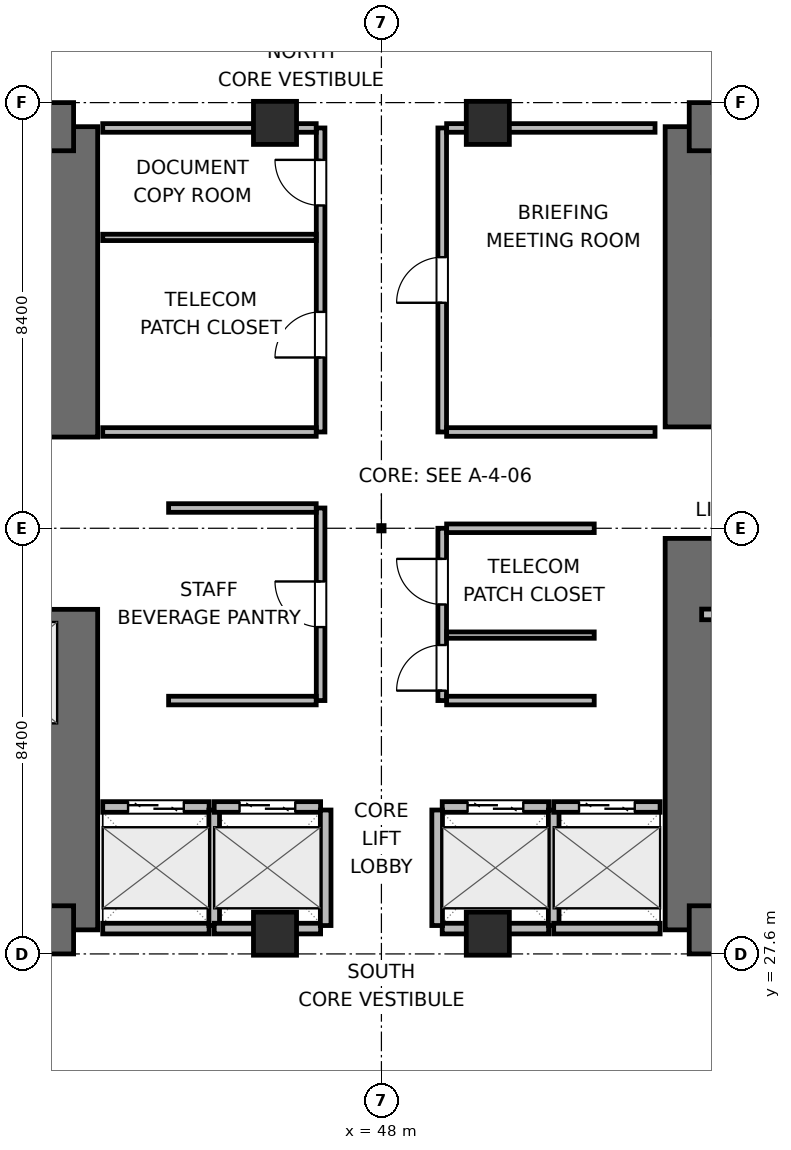
"""IFC4 building model, lengths in metres.
Left out: names, types, materials, properties, quantities, classifications, styles, units other than length and angle.
Written with IfcOpenShell. Run it as: python <this file> out.ifc"""

import sys

from ifc_helpers import new_model, si_unit, direction, frame, frame_2d, origin, origin_2d, place, context, subcontext, project, spatial, rectangle, extrude, element, fill, save


model = new_model("IFC4")
c1 = context("Model", 3, precision=1e-05, world=origin(), true_north=direction((0.0, 1.0)))
c2 = subcontext(c1, "Body", "Model", "MODEL_VIEW")
j1 = project(units=[si_unit("LENGTHUNIT", "METRE"), si_unit("PLANEANGLEUNIT", "RADIAN")], contexts=[c1])
p1 = place(None, origin())
s1 = spatial("IfcSite", under=j1, at=p1, CompositionType="ELEMENT")
p2 = place(p1, origin())
s2 = spatial("IfcBuilding", under=s1, at=p2, CompositionType="ELEMENT")
p3 = place(p2, frame((0.0, 0.0, 89.7)))
s3 = spatial("IfcBuildingStorey", under=s2, at=p3, CompositionType="ELEMENT", Elevation=89.7)
p4 = place(p3, frame((41.925, 28.075, 0.0), z_axis=(0.0, 0.0, 1.0), x_axis=(0.0, 1.0, 0.0)))
e1 = element("IfcWall", 1, at=p4, inside=s3, PredefinedType="SHEAR", context=c2, shape_type="SweptSolid", body=[
    extrude(rectangle(XDim=6.325, YDim=0.95, at=frame_2d((3.163, 0.0))), origin(), (0.0, 0.0, 1.0), 3.9),
])
p5 = place(p3, frame((41.925, 37.8, 0.0), z_axis=(0.0, 0.0, 1.0), x_axis=(0.0, 1.0, 0.0)))
e2 = element("IfcWall", 2, at=p5, inside=s3, PredefinedType="SHEAR", context=c2, shape_type="SweptSolid", body=[
    extrude(rectangle(XDim=6.125, YDim=0.95, at=frame_2d((3.062, 0.0))), origin(), (0.0, 0.0, 1.0), 3.9),
])
p6 = place(p3, frame((32.875, 28.075, 0.0), z_axis=(0.0, 0.0, 1.0), x_axis=(1.0, 0.0, 0.0)))
e3 = element("IfcWall", 3, at=p6, inside=s3, PredefinedType="SHEAR", context=c2, shape_type="SweptSolid", body=[
    extrude(rectangle(XDim=9.05, YDim=0.95, at=frame_2d((4.525, 0.0))), origin(), (0.0, 0.0, 1.0), 3.9),
])
p7 = place(p6, frame((4.975, 0.0, 0.0)))
e4 = element("IfcOpeningElement", 4, at=p7, cuts=e3, PredefinedType="OPENING", context=c2, shape_type="SweptSolid", body=[
    extrude(rectangle(XDim=1.05, YDim=2.04, at=frame_2d((0.525, 1.02))), frame((0.0, 0.485, 0.0), z_axis=(0.0, -1.0, 0.0), x_axis=(1.0, 0.0, 0.0)), (0.0, 0.0, 1.0), 0.97),
])
p8 = place(p3, frame((32.875, 43.925, 0.0), z_axis=(0.0, 0.0, 1.0), x_axis=(1.0, 0.0, 0.0)))
e5 = element("IfcWall", 5, at=p8, inside=s3, PredefinedType="SHEAR", context=c2, shape_type="SweptSolid", body=[
    extrude(rectangle(XDim=9.05, YDim=0.95, at=frame_2d((4.525, 0.0))), origin(), (0.0, 0.0, 1.0), 3.9),
])
p9 = place(p8, frame((0.975, 0.0, 0.0)))
e6 = element("IfcOpeningElement", 6, at=p9, cuts=e5, PredefinedType="OPENING", context=c2, shape_type="SweptSolid", body=[
    extrude(rectangle(XDim=0.95, YDim=2.04, at=frame_2d((0.475, 1.02))), frame((0.0, 0.485, 0.0), z_axis=(0.0, -1.0, 0.0), x_axis=(1.0, 0.0, 0.0)), (0.0, 0.0, 1.0), 0.97),
])
p10 = place(p8, frame((4.225, 0.0, 0.0)))
e7 = element("IfcOpeningElement", 7, at=p10, cuts=e5, PredefinedType="OPENING", context=c2, shape_type="SweptSolid", body=[
    extrude(rectangle(XDim=0.9, YDim=2.02, at=frame_2d((0.45, 1.01))), frame((0.0, 0.485, 0.0), z_axis=(0.0, -1.0, 0.0), x_axis=(1.0, 0.0, 0.0)), (0.0, 0.0, 1.0), 0.97),
])
p11 = place(p8, frame((7.125, 0.0, 0.0)))
e8 = element("IfcOpeningElement", 8, at=p11, cuts=e5, PredefinedType="OPENING", context=c2, shape_type="SweptSolid", body=[
    extrude(rectangle(XDim=0.9, YDim=2.02, at=frame_2d((0.45, 1.01))), frame((0.0, 0.485, 0.0), z_axis=(0.0, -1.0, 0.0), x_axis=(1.0, 0.0, 0.0)), (0.0, 0.0, 1.0), 0.97),
])
p12 = place(p3, frame((54.075, 28.075, 0.0), z_axis=(0.0, 0.0, 1.0), x_axis=(0.0, 1.0, 0.0)))
e9 = element("IfcWall", 9, at=p12, inside=s3, PredefinedType="SHEAR", context=c2, shape_type="SweptSolid", body=[
    extrude(rectangle(XDim=7.725, YDim=0.95, at=frame_2d((3.863, 0.0))), origin(), (0.0, 0.0, 1.0), 3.9),
])
p13 = place(p3, frame((54.075, 38.0, 0.0), z_axis=(0.0, 0.0, 1.0), x_axis=(0.0, 1.0, 0.0)))
e10 = element("IfcWall", 10, at=p13, inside=s3, PredefinedType="SHEAR", context=c2, shape_type="SweptSolid", body=[
    extrude(rectangle(XDim=5.925, YDim=0.95, at=frame_2d((2.962, 0.0))), origin(), (0.0, 0.0, 1.0), 3.9),
])
p14 = place(p3, frame((54.075, 28.075, 0.0), z_axis=(0.0, 0.0, 1.0), x_axis=(1.0, 0.0, 0.0)))
e11 = element("IfcWall", 11, at=p14, inside=s3, PredefinedType="SHEAR", context=c2, shape_type="SweptSolid", body=[
    extrude(rectangle(XDim=9.05, YDim=0.95, at=frame_2d((4.525, 0.0))), origin(), (0.0, 0.0, 1.0), 3.9),
])
p15 = place(p14, frame((3.925, 0.0, 0.0)))
e12 = element("IfcOpeningElement", 12, at=p15, cuts=e11, PredefinedType="OPENING", context=c2, shape_type="SweptSolid", body=[
    extrude(rectangle(XDim=1.05, YDim=2.04, at=frame_2d((0.525, 1.02))), frame((0.0, 0.485, 0.0), z_axis=(0.0, -1.0, 0.0), x_axis=(1.0, 0.0, 0.0)), (0.0, 0.0, 1.0), 0.97),
])
p16 = place(p3, frame((54.075, 43.925, 0.0), z_axis=(0.0, 0.0, 1.0), x_axis=(1.0, 0.0, 0.0)))
e13 = element("IfcWall", 13, at=p16, inside=s3, PredefinedType="SHEAR", context=c2, shape_type="SweptSolid", body=[
    extrude(rectangle(XDim=9.05, YDim=0.95, at=frame_2d((4.525, 0.0))), origin(), (0.0, 0.0, 1.0), 3.9),
])
for number, where, z_axis, x_axis in (
    (14, (45.9, 28.0, 0.0), (0.0, 0.0, 1.0), (1.0, 0.0, 0.0)),
    (15, (50.1, 28.0, 0.0), (0.0, 0.0, 1.0), (1.0, 0.0, 0.0)),
    (16, (45.9, 44.0, 0.0), (0.0, 0.0, 1.0), (1.0, 0.0, 0.0)),
    (17, (50.1, 44.0, 0.0), (0.0, 0.0, 1.0), (1.0, 0.0, 0.0)),
):
    element("IfcColumn", number, at=place(p3, frame(where, z_axis=z_axis, x_axis=x_axis)), inside=s3, PredefinedType="COLUMN", context=c2, shape_type="SweptSolid", body=[
        extrude(rectangle(XDim=0.85, YDim=0.85, at=origin_2d()), origin(), (0.0, 0.0, 1.0), 3.9),
    ])
p17 = place(p3, frame((54.32, 34.3, 0.0), z_axis=(0.0, 0.0, 1.0), x_axis=(1.0, 0.0, 0.0)))
e18 = element("IfcWall", 18, at=p17, inside=s3, PredefinedType="PARTITIONING", context=c2, shape_type="SweptSolid", body=[
    extrude(rectangle(XDim=3.48, YDim=0.21, at=frame_2d((1.74, 0.0))), origin(), (0.0, 0.0, 1.0), 3.64),
])
p18 = place(p3, frame((42.5, 30.5, 0.0), z_axis=(0.0, 0.0, 1.0), x_axis=(1.0, 0.0, 0.0)))
e19 = element("IfcWall", 19, at=p18, inside=s3, PredefinedType="PARTITIONING", context=c2, shape_type="SweptSolid", body=[
    extrude(rectangle(XDim=2.1, YDim=0.21, at=frame_2d((1.05, 0.0))), origin(), (0.0, 0.0, 1.0), 3.64),
])
p19 = place(p18, frame((0.5, 0.0, 0.0)))
e20 = element("IfcOpeningElement", 20, at=p19, cuts=e19, PredefinedType="OPENING", context=c2, shape_type="SweptSolid", body=[
    extrude(rectangle(XDim=1.1, YDim=2.04, at=frame_2d((0.55, 1.02))), frame((0.0, 0.115, 0.0), z_axis=(0.0, -1.0, 0.0), x_axis=(1.0, 0.0, 0.0)), (0.0, 0.0, 1.0), 0.23),
])
p20 = place(p3, frame((42.5, 28.1, 0.0), z_axis=(0.0, 0.0, 1.0), x_axis=(1.0, 0.0, 0.0)))
e21 = element("IfcWall", 21, at=p20, inside=s3, PredefinedType="PARTITIONING", context=c2, shape_type="SweptSolid", body=[
    extrude(rectangle(XDim=2.1, YDim=0.21, at=frame_2d((1.05, 0.0))), origin(), (0.0, 0.0, 1.0), 2.525),
])
p21 = place(p3, frame((44.7, 28.16, 0.0), z_axis=(0.0, 0.0, 1.0), x_axis=(0.0, 1.0, 0.0)))
e22 = element("IfcWall", 22, at=p21, inside=s3, PredefinedType="PARTITIONING", context=c2, shape_type="SweptSolid", body=[
    extrude(rectangle(XDim=2.28, YDim=0.21, at=frame_2d((1.14, 0.0))), origin(), (0.0, 0.0, 1.0), 3.64),
])
p22 = place(p3, frame((44.7, 30.5, 0.0), z_axis=(0.0, 0.0, 1.0), x_axis=(1.0, 0.0, 0.0)))
e23 = element("IfcWall", 23, at=p22, inside=s3, PredefinedType="PARTITIONING", context=c2, shape_type="SweptSolid", body=[
    extrude(rectangle(XDim=2.1, YDim=0.21, at=frame_2d((1.05, 0.0))), origin(), (0.0, 0.0, 1.0), 3.64),
])
p23 = place(p22, frame((0.5, 0.0, 0.0)))
e24 = element("IfcOpeningElement", 24, at=p23, cuts=e23, PredefinedType="OPENING", context=c2, shape_type="SweptSolid", body=[
    extrude(rectangle(XDim=1.1, YDim=2.04, at=frame_2d((0.55, 1.02))), frame((0.0, 0.115, 0.0), z_axis=(0.0, -1.0, 0.0), x_axis=(1.0, 0.0, 0.0)), (0.0, 0.0, 1.0), 0.23),
])
p24 = place(p3, frame((44.7, 28.1, 0.0), z_axis=(0.0, 0.0, 1.0), x_axis=(1.0, 0.0, 0.0)))
e25 = element("IfcWall", 25, at=p24, inside=s3, PredefinedType="PARTITIONING", context=c2, shape_type="SweptSolid", body=[
    extrude(rectangle(XDim=2.1, YDim=0.21, at=frame_2d((1.05, 0.0))), origin(), (0.0, 0.0, 1.0), 2.525),
])
p25 = place(p3, frame((46.9, 28.16, 0.0), z_axis=(0.0, 0.0, 1.0), x_axis=(0.0, 1.0, 0.0)))
e26 = element("IfcWall", 26, at=p25, inside=s3, PredefinedType="PARTITIONING", context=c2, shape_type="SweptSolid", body=[
    extrude(rectangle(XDim=2.28, YDim=0.21, at=frame_2d((1.14, 0.0))), origin(), (0.0, 0.0, 1.0), 3.64),
])
p26 = place(p3, frame((49.2, 30.5, 0.0), z_axis=(0.0, 0.0, 1.0), x_axis=(1.0, 0.0, 0.0)))
e27 = element("IfcWall", 27, at=p26, inside=s3, PredefinedType="PARTITIONING", context=c2, shape_type="SweptSolid", body=[
    extrude(rectangle(XDim=2.1, YDim=0.21, at=frame_2d((1.05, 0.0))), origin(), (0.0, 0.0, 1.0), 3.64),
])
p27 = place(p26, frame((0.5, 0.0, 0.0)))
e28 = element("IfcOpeningElement", 28, at=p27, cuts=e27, PredefinedType="OPENING", context=c2, shape_type="SweptSolid", body=[
    extrude(rectangle(XDim=1.1, YDim=2.04, at=frame_2d((0.55, 1.02))), frame((0.0, 0.115, 0.0), z_axis=(0.0, -1.0, 0.0), x_axis=(1.0, 0.0, 0.0)), (0.0, 0.0, 1.0), 0.23),
])
p28 = place(p3, frame((49.2, 28.1, 0.0), z_axis=(0.0, 0.0, 1.0), x_axis=(1.0, 0.0, 0.0)))
e29 = element("IfcWall", 29, at=p28, inside=s3, PredefinedType="PARTITIONING", context=c2, shape_type="SweptSolid", body=[
    extrude(rectangle(XDim=2.1, YDim=0.21, at=frame_2d((1.05, 0.0))), origin(), (0.0, 0.0, 1.0), 2.525),
])
for number, where, z_axis, x_axis in (
    (30, (49.1, 28.16, 0.0), (0.0, 0.0, 1.0), (0.0, 1.0, 0.0)),
    (31, (51.4, 28.16, 0.0), (0.0, 0.0, 1.0), (0.0, 1.0, 0.0)),
):
    element("IfcWall", number, at=place(p3, frame(where, z_axis=z_axis, x_axis=x_axis)), inside=s3, PredefinedType="PARTITIONING", context=c2, shape_type="SweptSolid", body=[
        extrude(rectangle(XDim=2.28, YDim=0.21, at=frame_2d((1.14, 0.0))), origin(), (0.0, 0.0, 1.0), 3.64),
    ])
p29 = place(p3, frame((51.4, 30.5, 0.0), z_axis=(0.0, 0.0, 1.0), x_axis=(1.0, 0.0, 0.0)))
e32 = element("IfcWall", 32, at=p29, inside=s3, PredefinedType="PARTITIONING", context=c2, shape_type="SweptSolid", body=[
    extrude(rectangle(XDim=2.1, YDim=0.21, at=frame_2d((1.05, 0.0))), origin(), (0.0, 0.0, 1.0), 3.64),
])
p30 = place(p29, frame((0.5, 0.0, 0.0)))
e33 = element("IfcOpeningElement", 33, at=p30, cuts=e32, PredefinedType="OPENING", context=c2, shape_type="SweptSolid", body=[
    extrude(rectangle(XDim=1.1, YDim=2.04, at=frame_2d((0.55, 1.02))), frame((0.0, 0.115, 0.0), z_axis=(0.0, -1.0, 0.0), x_axis=(1.0, 0.0, 0.0)), (0.0, 0.0, 1.0), 0.23),
])
p31 = place(p3, frame((51.4, 28.1, 0.0), z_axis=(0.0, 0.0, 1.0), x_axis=(1.0, 0.0, 0.0)))
e34 = element("IfcWall", 34, at=p31, inside=s3, PredefinedType="PARTITIONING", context=c2, shape_type="SweptSolid", body=[
    extrude(rectangle(XDim=2.1, YDim=0.21, at=frame_2d((1.05, 0.0))), origin(), (0.0, 0.0, 1.0), 2.525),
])
p32 = place(p3, frame((46.8, 32.6, 0.0), z_axis=(0.0, 0.0, 1.0), x_axis=(0.0, 1.0, 0.0)))
e35 = element("IfcWall", 35, at=p32, inside=s3, PredefinedType="PARTITIONING", context=c2, shape_type="SweptSolid", body=[
    extrude(rectangle(XDim=3.8, YDim=0.17, at=frame_2d((1.9, 0.0))), origin(), (0.0, 0.0, 1.0), 3.64),
])
p33 = place(p32, frame((1.45, 0.0, 0.0)))
e36 = element("IfcOpeningElement", 36, at=p33, cuts=e35, PredefinedType="OPENING", context=c2, shape_type="SweptSolid", body=[
    extrude(rectangle(XDim=0.9, YDim=2.02, at=frame_2d((0.45, 1.01))), frame((0.0, 0.095, 0.0), z_axis=(0.0, -1.0, 0.0), x_axis=(1.0, 0.0, 0.0)), (0.0, 0.0, 1.0), 0.19),
])
for number, where, z_axis, x_axis in (
    (37, (43.8, 32.6, 0.0), (0.0, 0.0, 1.0), (1.0, 0.0, 0.0)),
    (38, (43.8, 36.4, 0.0), (0.0, 0.0, 1.0), (1.0, 0.0, 0.0)),
):
    element("IfcWall", number, at=place(p3, frame(where, z_axis=z_axis, x_axis=x_axis)), inside=s3, PredefinedType="PARTITIONING", context=c2, shape_type="SweptSolid", body=[
        extrude(rectangle(XDim=2.913, YDim=0.17, at=frame_2d((1.457, 0.0))), origin(), (0.0, 0.0, 1.0), 3.64),
    ])
p34 = place(p3, frame((49.2, 32.6, 0.0), z_axis=(0.0, 0.0, 1.0), x_axis=(0.0, 1.0, 0.0)))
e39 = element("IfcWall", 39, at=p34, inside=s3, PredefinedType="PARTITIONING", context=c2, shape_type="SweptSolid", body=[
    extrude(rectangle(XDim=3.4, YDim=0.17, at=frame_2d((1.7, 0.0))), origin(), (0.0, 0.0, 1.0), 3.64),
])
p35 = place(p34, frame((0.196, 0.0, 0.0)))
e40 = element("IfcOpeningElement", 40, at=p35, cuts=e39, PredefinedType="OPENING", context=c2, shape_type="SweptSolid", body=[
    extrude(rectangle(XDim=0.9, YDim=2.02, at=frame_2d((0.45, 1.01))), frame((0.0, 0.095, 0.0), z_axis=(0.0, -1.0, 0.0), x_axis=(1.0, 0.0, 0.0)), (0.0, 0.0, 1.0), 0.19),
])
p36 = place(p34, frame((1.896, 0.0, 0.0)))
e41 = element("IfcOpeningElement", 41, at=p36, cuts=e39, PredefinedType="OPENING", context=c2, shape_type="SweptSolid", body=[
    extrude(rectangle(XDim=0.9, YDim=2.02, at=frame_2d((0.45, 1.01))), frame((0.0, 0.095, 0.0), z_axis=(0.0, -1.0, 0.0), x_axis=(1.0, 0.0, 0.0)), (0.0, 0.0, 1.0), 0.19),
])
for number, where, z_axis, x_axis in (
    (42, (49.287, 32.6, 0.0), (0.0, 0.0, 1.0), (1.0, 0.0, 0.0)),
    (43, (49.287, 36.0, 0.0), (0.0, 0.0, 1.0), (1.0, 0.0, 0.0)),
):
    element("IfcWall", number, at=place(p3, frame(where, z_axis=z_axis, x_axis=x_axis)), inside=s3, PredefinedType="PARTITIONING", context=c2, shape_type="SweptSolid", body=[
        extrude(rectangle(XDim=2.913, YDim=0.17, at=frame_2d((1.457, 0.0))), origin(), (0.0, 0.0, 1.0), 3.64),
    ])
p37 = place(p3, frame((49.287, 33.892, 0.0), z_axis=(0.0, 0.0, 1.0), x_axis=(1.0, 0.0, 0.0)))
e44 = element("IfcWall", 44, at=p37, inside=s3, PredefinedType="PARTITIONING", context=c2, shape_type="SweptSolid", body=[
    extrude(rectangle(XDim=2.913, YDim=0.125, at=frame_2d((1.457, 0.0))), origin(), (0.0, 0.0, 1.0), 3.64),
])
p38 = place(p3, frame((46.8, 37.9, 0.0), z_axis=(0.0, 0.0, 1.0), x_axis=(0.0, 1.0, 0.0)))
e45 = element("IfcWall", 45, at=p38, inside=s3, PredefinedType="PARTITIONING", context=c2, shape_type="SweptSolid", body=[
    extrude(rectangle(XDim=6.0, YDim=0.17, at=frame_2d((3.0, 0.0))), origin(), (0.0, 0.0, 1.0), 3.64),
])
p39 = place(p38, frame((1.47, 0.0, 0.0)))
e46 = element("IfcOpeningElement", 46, at=p39, cuts=e45, PredefinedType="OPENING", context=c2, shape_type="SweptSolid", body=[
    extrude(rectangle(XDim=0.9, YDim=2.02, at=frame_2d((0.45, 1.01))), frame((0.0, 0.095, 0.0), z_axis=(0.0, -1.0, 0.0), x_axis=(1.0, 0.0, 0.0)), (0.0, 0.0, 1.0), 0.19),
])
p40 = place(p38, frame((4.47, 0.0, 0.0)))
e47 = element("IfcOpeningElement", 47, at=p40, cuts=e45, PredefinedType="OPENING", context=c2, shape_type="SweptSolid", body=[
    extrude(rectangle(XDim=0.9, YDim=2.02, at=frame_2d((0.45, 1.01))), frame((0.0, 0.095, 0.0), z_axis=(0.0, -1.0, 0.0), x_axis=(1.0, 0.0, 0.0)), (0.0, 0.0, 1.0), 0.19),
])
p41 = place(p3, frame((42.5, 37.9, 0.0), z_axis=(0.0, 0.0, 1.0), x_axis=(1.0, 0.0, 0.0)))
e48 = element("IfcWall", 48, at=p41, inside=s3, PredefinedType="PARTITIONING", context=c2, shape_type="SweptSolid", body=[
    extrude(rectangle(XDim=4.213, YDim=0.17, at=frame_2d((2.106, 0.0))), origin(), (0.0, 0.0, 1.0), 3.64),
])
p42 = place(p3, frame((42.5, 43.9, 0.0), z_axis=(0.0, 0.0, 1.0), x_axis=(1.0, 0.0, 0.0)))
e49 = element("IfcWall", 49, at=p42, inside=s3, PredefinedType="PARTITIONING", context=c2, shape_type="SweptSolid", body=[
    extrude(rectangle(XDim=4.213, YDim=0.17, at=frame_2d((2.106, 0.0))), origin(), (0.0, 0.0, 1.0), 2.525),
])
p43 = place(p3, frame((42.5, 41.74, 0.0), z_axis=(0.0, 0.0, 1.0), x_axis=(1.0, 0.0, 0.0)))
e50 = element("IfcWall", 50, at=p43, inside=s3, PredefinedType="PARTITIONING", context=c2, shape_type="SweptSolid", body=[
    extrude(rectangle(XDim=4.213, YDim=0.125, at=frame_2d((2.106, 0.0))), origin(), (0.0, 0.0, 1.0), 3.64),
])
p44 = place(p3, frame((49.2, 37.9, 0.0), z_axis=(0.0, 0.0, 1.0), x_axis=(0.0, 1.0, 0.0)))
e51 = element("IfcWall", 51, at=p44, inside=s3, PredefinedType="PARTITIONING", context=c2, shape_type="SweptSolid", body=[
    extrude(rectangle(XDim=6.0, YDim=0.17, at=frame_2d((3.0, 0.0))), origin(), (0.0, 0.0, 1.0), 3.64),
])
p45 = place(p44, frame((2.55, 0.0, 0.0)))
e52 = element("IfcOpeningElement", 52, at=p45, cuts=e51, PredefinedType="OPENING", context=c2, shape_type="SweptSolid", body=[
    extrude(rectangle(XDim=0.9, YDim=2.02, at=frame_2d((0.45, 1.01))), frame((0.0, 0.095, 0.0), z_axis=(0.0, -1.0, 0.0), x_axis=(1.0, 0.0, 0.0)), (0.0, 0.0, 1.0), 0.19),
])
p46 = place(p3, frame((49.287, 37.9, 0.0), z_axis=(0.0, 0.0, 1.0), x_axis=(1.0, 0.0, 0.0)))
e53 = element("IfcWall", 53, at=p46, inside=s3, PredefinedType="PARTITIONING", context=c2, shape_type="SweptSolid", body=[
    extrude(rectangle(XDim=4.113, YDim=0.17, at=frame_2d((2.056, 0.0))), origin(), (0.0, 0.0, 1.0), 3.64),
])
p47 = place(p3, frame((49.287, 43.9, 0.0), z_axis=(0.0, 0.0, 1.0), x_axis=(1.0, 0.0, 0.0)))
e54 = element("IfcWall", 54, at=p47, inside=s3, PredefinedType="PARTITIONING", context=c2, shape_type="SweptSolid", body=[
    extrude(rectangle(XDim=4.113, YDim=0.17, at=frame_2d((2.056, 0.0))), origin(), (0.0, 0.0, 1.0), 2.525),
])
p48 = place(p19, origin())
e55 = element("IfcDoor", 55, at=p48, inside=s3, OperationType="DOUBLE_DOOR_SLIDING", PredefinedType="DOOR", context=c2, shape_type="SweptSolid", body=[
    extrude(rectangle(XDim=1.1, YDim=2.04, at=frame_2d((0.55, 1.02))), frame((0.0, 0.025, 0.0), z_axis=(0.0, -1.0, 0.0), x_axis=(1.0, 0.0, 0.0)), (0.0, 0.0, 1.0), 0.05),
])
fill(e20, e55)
p49 = place(p23, origin())
e56 = element("IfcDoor", 56, at=p49, inside=s3, OperationType="DOUBLE_DOOR_SLIDING", PredefinedType="DOOR", context=c2, shape_type="SweptSolid", body=[
    extrude(rectangle(XDim=1.1, YDim=2.04, at=frame_2d((0.55, 1.02))), frame((0.0, 0.025, 0.0), z_axis=(0.0, -1.0, 0.0), x_axis=(1.0, 0.0, 0.0)), (0.0, 0.0, 1.0), 0.05),
])
fill(e24, e56)
p50 = place(p27, origin())
e57 = element("IfcDoor", 57, at=p50, inside=s3, OperationType="DOUBLE_DOOR_SLIDING", PredefinedType="DOOR", context=c2, shape_type="SweptSolid", body=[
    extrude(rectangle(XDim=1.1, YDim=2.04, at=frame_2d((0.55, 1.02))), frame((0.0, 0.025, 0.0), z_axis=(0.0, -1.0, 0.0), x_axis=(1.0, 0.0, 0.0)), (0.0, 0.0, 1.0), 0.05),
])
fill(e28, e57)
p51 = place(p30, origin())
e58 = element("IfcDoor", 58, at=p51, inside=s3, OperationType="DOUBLE_DOOR_SLIDING", PredefinedType="DOOR", context=c2, shape_type="SweptSolid", body=[
    extrude(rectangle(XDim=1.1, YDim=2.04, at=frame_2d((0.55, 1.02))), frame((0.0, 0.025, 0.0), z_axis=(0.0, -1.0, 0.0), x_axis=(1.0, 0.0, 0.0)), (0.0, 0.0, 1.0), 0.05),
])
fill(e33, e58)
p52 = place(p33, origin())
e59 = element("IfcDoor", 59, at=p52, inside=s3, OperationType="SINGLE_SWING_RIGHT", PredefinedType="DOOR", context=c2, shape_type="SweptSolid", body=[
    extrude(rectangle(XDim=0.9, YDim=2.02, at=frame_2d((0.45, 1.01))), frame((0.0, 0.025, 0.0), z_axis=(0.0, -1.0, 0.0), x_axis=(1.0, 0.0, 0.0)), (0.0, 0.0, 1.0), 0.05),
])
fill(e36, e59)
p53 = place(p35, origin())
e60 = element("IfcDoor", 60, at=p53, inside=s3, OperationType="SINGLE_SWING_LEFT", PredefinedType="DOOR", context=c2, shape_type="SweptSolid", body=[
    extrude(rectangle(XDim=0.9, YDim=2.02, at=frame_2d((0.45, 1.01))), frame((0.0, 0.025, 0.0), z_axis=(0.0, -1.0, 0.0), x_axis=(1.0, 0.0, 0.0)), (0.0, 0.0, 1.0), 0.05),
])
fill(e40, e60)
p54 = place(p36, origin())
e61 = element("IfcDoor", 61, at=p54, inside=s3, OperationType="SINGLE_SWING_RIGHT", PredefinedType="DOOR", context=c2, shape_type="SweptSolid", body=[
    extrude(rectangle(XDim=0.9, YDim=2.02, at=frame_2d((0.45, 1.01))), frame((0.0, 0.025, 0.0), z_axis=(0.0, -1.0, 0.0), x_axis=(1.0, 0.0, 0.0)), (0.0, 0.0, 1.0), 0.05),
])
fill(e41, e61)
p55 = place(p39, origin())
e62 = element("IfcDoor", 62, at=p55, inside=s3, OperationType="SINGLE_SWING_LEFT", PredefinedType="DOOR", context=c2, shape_type="SweptSolid", body=[
    extrude(rectangle(XDim=0.9, YDim=2.02, at=frame_2d((0.45, 1.01))), frame((0.0, 0.025, 0.0), z_axis=(0.0, -1.0, 0.0), x_axis=(1.0, 0.0, 0.0)), (0.0, 0.0, 1.0), 0.05),
])
fill(e46, e62)
p56 = place(p40, origin())
e63 = element("IfcDoor", 63, at=p56, inside=s3, OperationType="SINGLE_SWING_RIGHT", PredefinedType="DOOR", context=c2, shape_type="SweptSolid", body=[
    extrude(rectangle(XDim=0.9, YDim=2.02, at=frame_2d((0.45, 1.01))), frame((0.0, 0.025, 0.0), z_axis=(0.0, -1.0, 0.0), x_axis=(1.0, 0.0, 0.0)), (0.0, 0.0, 1.0), 0.05),
])
fill(e47, e63)
p57 = place(p45, origin())
e64 = element("IfcDoor", 64, at=p57, inside=s3, OperationType="SINGLE_SWING_LEFT", PredefinedType="DOOR", context=c2, shape_type="SweptSolid", body=[
    extrude(rectangle(XDim=0.9, YDim=2.02, at=frame_2d((0.45, 1.01))), frame((0.0, 0.025, 0.0), z_axis=(0.0, -1.0, 0.0), x_axis=(1.0, 0.0, 0.0)), (0.0, 0.0, 1.0), 0.05),
])
fill(e52, e64)
save(model, sys.argv[1])
